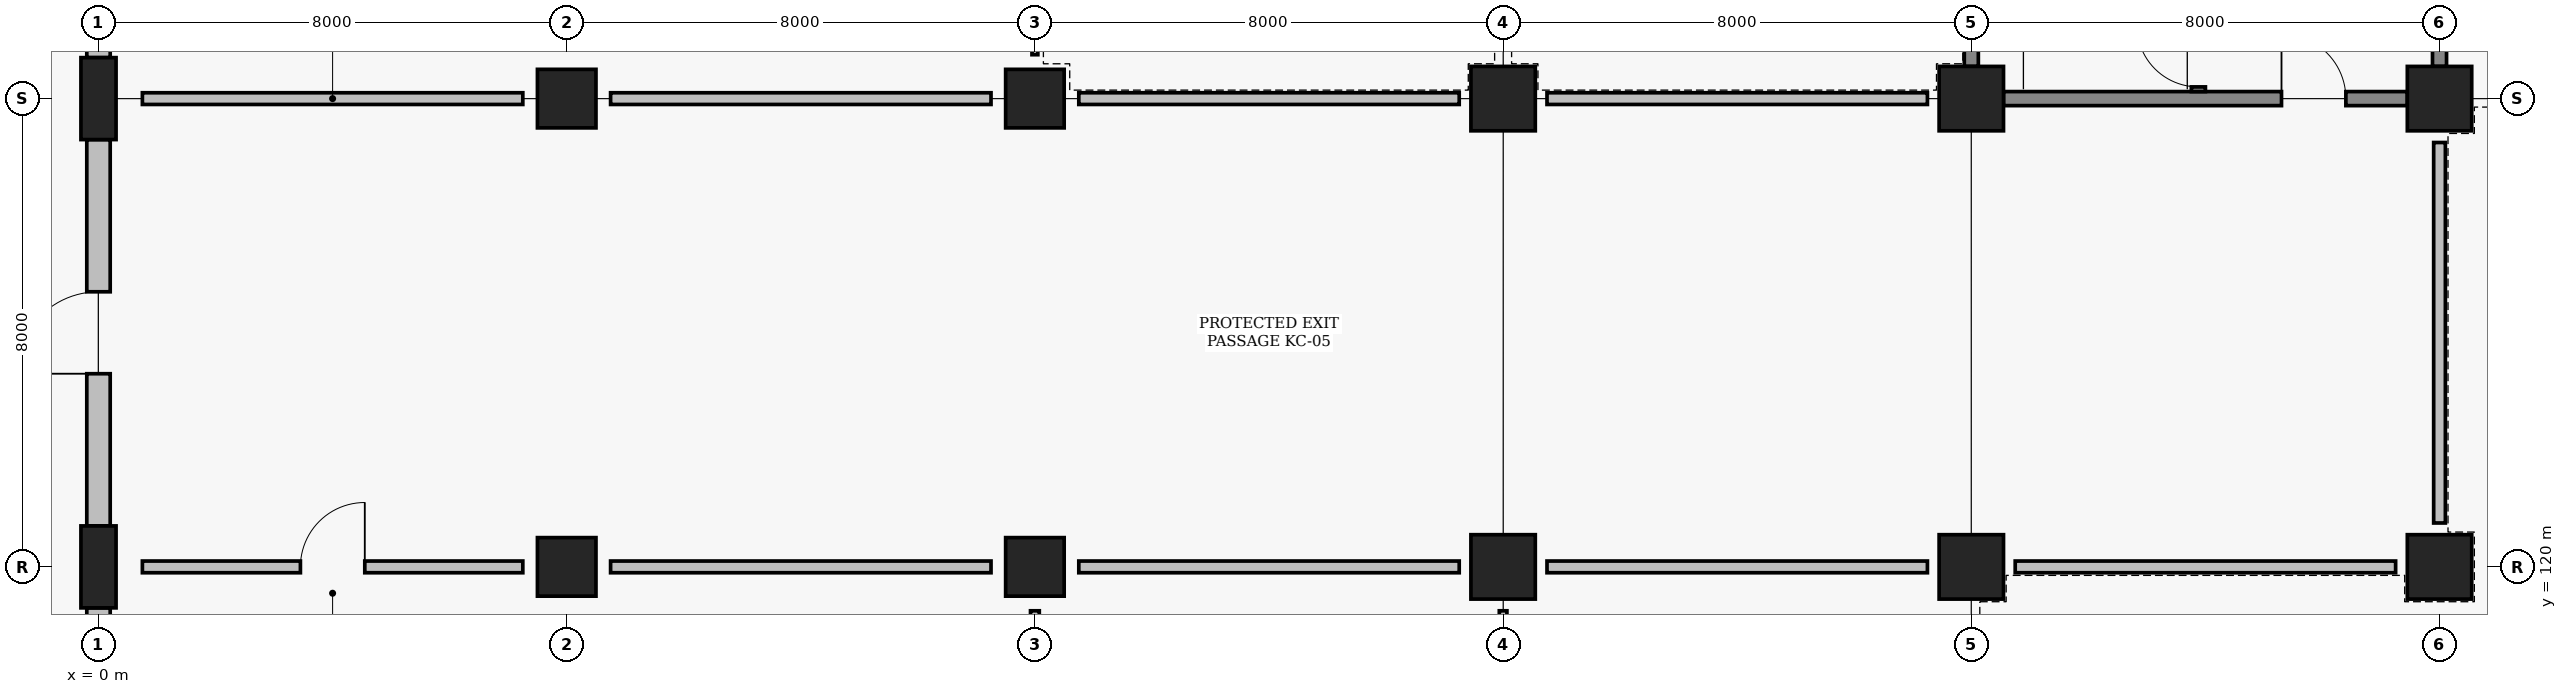
"""IFC4 building model, lengths in metres.
Left out: names, types, materials, properties, quantities, classifications, styles, units other than length and angle.
Written with IfcOpenShell. Run it as: python <this file> out.ifc"""

import sys

from ifc_helpers import new_model, si_unit, direction, frame, frame_2d, origin, origin_2d, place, context, subcontext, project, spatial, rectangle, circle, extrude, element, fill, save


model = new_model("IFC4")
c1 = context("Model", 3, precision=1e-05, world=origin(), true_north=direction((0.0, 1.0)))
c2 = subcontext(c1, "Body", "Model", "MODEL_VIEW")
j1 = project(units=[si_unit("LENGTHUNIT", "METRE"), si_unit("PLANEANGLEUNIT", "RADIAN")], contexts=[c1])
p1 = place(None, origin())
s1 = spatial("IfcSite", under=j1, at=p1, CompositionType="ELEMENT")
p2 = place(p1, origin())
s2 = spatial("IfcBuilding", under=s1, at=p2, CompositionType="ELEMENT")
p3 = place(p2, origin())
s3 = spatial("IfcBuildingStorey", under=s2, at=p3, CompositionType="ELEMENT", Elevation=0.0)
for number, where, z_axis, x_axis in (
    (1, (0.0, 120.0, 0.0), (0.0, 0.0, 1.0), (1.0, 0.0, 0.0)),
    (2, (0.0, 128.0, 0.0), (0.0, 0.0, 1.0), (1.0, 0.0, 0.0)),
):
    element("IfcColumn", number, at=place(p3, frame(where, z_axis=z_axis, x_axis=x_axis)), inside=s3, PredefinedType="PILASTER", context=c2, shape_type="SweptSolid", body=[
        extrude(rectangle(XDim=0.6, YDim=1.4, at=origin_2d()), origin(), (0.0, 0.0, 1.0), 4.8),
    ])
for number, where, z_axis, x_axis in (
    (3, (8.0, 120.0, 0.0), (0.0, 0.0, 1.0), (1.0, 0.0, 0.0)),
    (4, (8.0, 128.0, 0.0), (0.0, 0.0, 1.0), (1.0, 0.0, 0.0)),
    (5, (16.0, 120.0, 0.0), (0.0, 0.0, 1.0), (1.0, 0.0, 0.0)),
    (6, (16.0, 128.0, 0.0), (0.0, 0.0, 1.0), (1.0, 0.0, 0.0)),
):
    element("IfcColumn", number, at=place(p3, frame(where, z_axis=z_axis, x_axis=x_axis)), inside=s3, PredefinedType="COLUMN", context=c2, shape_type="SweptSolid", body=[
        extrude(circle(Radius=0.5, at=origin_2d()), origin(), (0.0, 0.0, 1.0), 4.8),
    ])
for number, where, z_axis, x_axis in (
    (7, (24.0, 120.0, 0.0), (0.0, 0.0, 1.0), (1.0, 0.0, 0.0)),
    (8, (24.0, 128.0, 0.0), (0.0, 0.0, 1.0), (1.0, 0.0, 0.0)),
    (9, (32.0, 120.0, 0.0), (0.0, 0.0, 1.0), (1.0, 0.0, 0.0)),
    (10, (32.0, 128.0, 0.0), (0.0, 0.0, 1.0), (1.0, 0.0, 0.0)),
    (11, (40.0, 120.0, 0.0), (0.0, 0.0, 1.0), (1.0, 0.0, 0.0)),
    (12, (40.0, 128.0, 0.0), (0.0, 0.0, 1.0), (1.0, 0.0, 0.0)),
):
    element("IfcColumn", number, at=place(p3, frame(where, z_axis=z_axis, x_axis=x_axis)), inside=s3, PredefinedType="COLUMN", context=c2, shape_type="SweptSolid", body=[
        extrude(rectangle(XDim=1.1, YDim=1.1, at=origin_2d()), origin(), (0.0, 0.0, 1.0), 4.8),
    ])
p4 = place(p3, frame((0.0, 112.7, 0.0), z_axis=(0.0, 0.0, 1.0), x_axis=(0.0, 1.0, 0.0)))
e13 = element("IfcWall", 13, at=p4, inside=s3, PredefinedType="SOLIDWALL", context=c2, shape_type="SweptSolid", body=[
    extrude(rectangle(XDim=6.6, YDim=0.4, at=frame_2d((3.3, 0.0))), origin(), (0.0, 0.0, 1.0), 3.66),
])
p5 = place(p4, frame((1.5, 0.0, 0.0)))
e14 = element("IfcOpeningElement", 14, at=p5, cuts=e13, PredefinedType="OPENING", context=c2, shape_type="SweptSolid", body=[
    extrude(rectangle(XDim=3.6, YDim=2.8, at=frame_2d((1.8, 1.4))), frame((0.0, 0.21, 0.0), z_axis=(0.0, -1.0, 0.0), x_axis=(1.0, 0.0, 0.0)), (0.0, 0.0, 1.0), 0.42),
])
p6 = place(p3, frame((0.0, 120.7, 0.0), z_axis=(0.0, 0.0, 1.0), x_axis=(0.0, 1.0, 0.0)))
e15 = element("IfcWall", 15, at=p6, inside=s3, PredefinedType="SOLIDWALL", context=c2, shape_type="SweptSolid", body=[
    extrude(rectangle(XDim=6.6, YDim=0.4, at=frame_2d((3.3, 0.0))), origin(), (0.0, 0.0, 1.0), 3.66),
])
p7 = place(p6, frame((2.6, 0.0, 0.0)))
e16 = element("IfcOpeningElement", 16, at=p7, cuts=e15, PredefinedType="OPENING", context=c2, shape_type="SweptSolid", body=[
    extrude(rectangle(XDim=1.4, YDim=2.2, at=frame_2d((0.7, 1.1))), frame((0.0, 0.21, 0.0), z_axis=(0.0, -1.0, 0.0), x_axis=(1.0, 0.0, 0.0)), (0.0, 0.0, 1.0), 0.42),
])
p8 = place(p3, frame((0.0, 128.7, 0.0), z_axis=(0.0, 0.0, 1.0), x_axis=(0.0, 1.0, 0.0)))
e17 = element("IfcWall", 17, at=p8, inside=s3, PredefinedType="SOLIDWALL", context=c2, shape_type="SweptSolid", body=[
    extrude(rectangle(XDim=6.6, YDim=0.4, at=frame_2d((3.3, 0.0))), origin(), (0.0, 0.0, 1.0), 3.91),
])
p9 = place(p8, frame((1.6, 0.0, 0.0)))
e18 = element("IfcOpeningElement", 18, at=p9, cuts=e17, PredefinedType="OPENING", context=c2, shape_type="SweptSolid", body=[
    extrude(rectangle(XDim=3.4, YDim=2.75, at=frame_2d((1.7, 1.375))), frame((0.0, 0.21, 0.0), z_axis=(0.0, -1.0, 0.0), x_axis=(1.0, 0.0, 0.0)), (0.0, 0.0, 1.0), 0.42),
])
p10 = place(p3, frame((32.55, 128.0, 0.0), z_axis=(0.0, 0.0, 1.0), x_axis=(1.0, 0.0, 0.0)))
e19 = element("IfcWall", 19, at=p10, inside=s3, PredefinedType="SHEAR", context=c2, shape_type="SweptSolid", body=[
    extrude(rectangle(XDim=6.9, YDim=0.24, at=frame_2d((3.45, 0.0))), origin(), (0.0, 0.0, 1.0), 3.77),
])
p11 = place(p10, frame((4.75, 0.0, 0.0)))
e20 = element("IfcOpeningElement", 20, at=p11, cuts=e19, PredefinedType="OPENING", context=c2, shape_type="SweptSolid", body=[
    extrude(rectangle(XDim=1.1, YDim=2.2, at=frame_2d((0.55, 1.1))), frame((0.0, 0.13, 0.0), z_axis=(0.0, -1.0, 0.0), x_axis=(1.0, 0.0, 0.0)), (0.0, 0.0, 1.0), 0.26),
])
p12 = place(p3, frame((32.0, 128.55, 0.0), z_axis=(0.0, 0.0, 1.0), x_axis=(0.0, 1.0, 0.0)))
e21 = element("IfcWall", 21, at=p12, inside=s3, PredefinedType="SHEAR", context=c2, shape_type="SweptSolid", body=[
    extrude(rectangle(XDim=6.9, YDim=0.24, at=frame_2d((3.45, 0.0))), origin(), (0.0, 0.0, 1.0), 3.62),
])
p13 = place(p3, frame((40.0, 128.55, 0.0), z_axis=(0.0, 0.0, 1.0), x_axis=(0.0, 1.0, 0.0)))
e22 = element("IfcWall", 22, at=p13, inside=s3, PredefinedType="SHEAR", context=c2, shape_type="SweptSolid", body=[
    extrude(rectangle(XDim=6.9, YDim=0.24, at=frame_2d((3.45, 0.0))), origin(), (0.0, 0.0, 1.0), 3.77),
])
p14 = place(p3, frame((35.88, 128.12, 0.0), z_axis=(0.0, 0.0, 1.0), x_axis=(0.0, 1.0, 0.0)))
e23 = element("IfcWall", 23, at=p14, inside=s3, PredefinedType="SHEAR", context=c2, shape_type="SweptSolid", body=[
    extrude(rectangle(XDim=7.76, YDim=0.24, at=frame_2d((3.88, 0.0))), origin(), (0.0, 0.0, 1.0), 3.97),
])
p15 = place(p14, frame((0.08, 0.0, 0.0)))
e24 = element("IfcOpeningElement", 24, at=p15, cuts=e23, PredefinedType="OPENING", context=c2, shape_type="SweptSolid", body=[
    extrude(rectangle(XDim=1.05, YDim=2.15, at=frame_2d((0.525, 1.075))), frame((0.0, 0.13, 0.0), z_axis=(0.0, -1.0, 0.0), x_axis=(1.0, 0.0, 0.0)), (0.0, 0.0, 1.0), 0.26),
])
p16 = place(p3, frame((0.75, 120.0, 0.0), z_axis=(0.0, 0.0, 1.0), x_axis=(1.0, 0.0, 0.0)))
e25 = element("IfcWall", 25, at=p16, inside=s3, PredefinedType="PARTITIONING", context=c2, shape_type="SweptSolid", body=[
    extrude(rectangle(XDim=6.5, YDim=0.2, at=frame_2d((3.25, 0.0))), origin(), (0.0, 0.0, 1.0), 3.66),
])
p17 = place(p16, frame((2.7, 0.0, 0.0)))
e26 = element("IfcOpeningElement", 26, at=p17, cuts=e25, PredefinedType="OPENING", context=c2, shape_type="SweptSolid", body=[
    extrude(rectangle(XDim=1.1, YDim=2.2, at=frame_2d((0.55, 1.1))), frame((0.0, 0.11, 0.0), z_axis=(0.0, -1.0, 0.0), x_axis=(1.0, 0.0, 0.0)), (0.0, 0.0, 1.0), 0.22),
])
for number, where, z_axis, x_axis in (
    (27, (0.75, 128.0, 0.0), (0.0, 0.0, 1.0), (1.0, 0.0, 0.0)),
    (28, (8.75, 120.0, 0.0), (0.0, 0.0, 1.0), (1.0, 0.0, 0.0)),
    (29, (8.75, 128.0, 0.0), (0.0, 0.0, 1.0), (1.0, 0.0, 0.0)),
    (30, (16.75, 120.0, 0.0), (0.0, 0.0, 1.0), (1.0, 0.0, 0.0)),
    (31, (16.75, 128.0, 0.0), (0.0, 0.0, 1.0), (1.0, 0.0, 0.0)),
):
    element("IfcWall", number, at=place(p3, frame(where, z_axis=z_axis, x_axis=x_axis)), inside=s3, PredefinedType="PARTITIONING", context=c2, shape_type="SweptSolid", body=[
        extrude(rectangle(XDim=6.5, YDim=0.2, at=frame_2d((3.25, 0.0))), origin(), (0.0, 0.0, 1.0), 3.91),
    ])
for number, where, z_axis, x_axis in (
    (32, (24.75, 120.0, 0.0), (0.0, 0.0, 1.0), (1.0, 0.0, 0.0)),
    (33, (24.75, 128.0, 0.0), (0.0, 0.0, 1.0), (1.0, 0.0, 0.0)),
):
    element("IfcWall", number, at=place(p3, frame(where, z_axis=z_axis, x_axis=x_axis)), inside=s3, PredefinedType="PARTITIONING", context=c2, shape_type="SweptSolid", body=[
        extrude(rectangle(XDim=6.5, YDim=0.2, at=frame_2d((3.25, 0.0))), origin(), (0.0, 0.0, 1.0), 3.87),
    ])
p18 = place(p3, frame((40.0, 120.75, 0.0), z_axis=(0.0, 0.0, 1.0), x_axis=(0.0, 1.0, 0.0)))
e34 = element("IfcWall", 34, at=p18, inside=s3, PredefinedType="PARTITIONING", context=c2, shape_type="SweptSolid", body=[
    extrude(rectangle(XDim=6.5, YDim=0.2, at=frame_2d((3.25, 0.0))), origin(), (0.0, 0.0, 1.0), 3.77),
])
p19 = place(p3, frame((32.75, 120.0, 0.0), z_axis=(0.0, 0.0, 1.0), x_axis=(1.0, 0.0, 0.0)))
e35 = element("IfcWall", 35, at=p19, inside=s3, PredefinedType="PARTITIONING", context=c2, shape_type="SweptSolid", body=[
    extrude(rectangle(XDim=6.5, YDim=0.2, at=frame_2d((3.25, 0.0))), origin(), (0.0, 0.0, 1.0), 3.87),
])
p20 = place(p3, frame((16.0, 112.75, 0.0), z_axis=(0.0, 0.0, 1.0), x_axis=(0.0, 1.0, 0.0)))
e36 = element("IfcWall", 36, at=p20, inside=s3, PredefinedType="PARTITIONING", context=c2, shape_type="SweptSolid", body=[
    extrude(rectangle(XDim=6.5, YDim=0.15, at=frame_2d((3.25, 0.0))), origin(), (0.0, 0.0, 1.0), 3.81),
])
p21 = place(p20, frame((2.35, 0.0, 0.0)))
e37 = element("IfcOpeningElement", 37, at=p21, cuts=e36, PredefinedType="OPENING", context=c2, shape_type="SweptSolid", body=[
    extrude(rectangle(XDim=1.8, YDim=2.3, at=frame_2d((0.9, 1.15))), frame((0.0, 0.085, 0.0), z_axis=(0.0, -1.0, 0.0), x_axis=(1.0, 0.0, 0.0)), (0.0, 0.0, 1.0), 0.17),
])
p22 = place(p3, frame((24.0, 112.75, 0.0), z_axis=(0.0, 0.0, 1.0), x_axis=(0.0, 1.0, 0.0)))
e38 = element("IfcWall", 38, at=p22, inside=s3, PredefinedType="PARTITIONING", context=c2, shape_type="SweptSolid", body=[
    extrude(rectangle(XDim=6.5, YDim=0.13, at=frame_2d((3.25, 0.0))), origin(), (0.0, 0.0, 1.0), 3.77),
])
p23 = place(p22, frame((2.75, 0.0, 0.0)))
e39 = element("IfcOpeningElement", 39, at=p23, cuts=e38, PredefinedType="OPENING", context=c2, shape_type="SweptSolid", body=[
    extrude(rectangle(XDim=1.0, YDim=2.1, at=frame_2d((0.5, 1.05))), frame((0.0, 0.075, 0.0), z_axis=(0.0, -1.0, 0.0), x_axis=(1.0, 0.0, 0.0)), (0.0, 0.0, 1.0), 0.15),
])
p24 = place(p3, frame((16.0, 128.75, 0.0), z_axis=(0.0, 0.0, 1.0), x_axis=(0.0, 1.0, 0.0)))
e40 = element("IfcWall", 40, at=p24, inside=s3, PredefinedType="PARTITIONING", context=c2, shape_type="SweptSolid", body=[
    extrude(rectangle(XDim=6.5, YDim=0.1, at=frame_2d((3.25, 0.0))), origin(), (0.0, 0.0, 1.0), 3.81),
])
p25 = place(p24, frame((2.775, 0.0, 0.0)))
e41 = element("IfcOpeningElement", 41, at=p25, cuts=e40, PredefinedType="OPENING", context=c2, shape_type="SweptSolid", body=[
    extrude(rectangle(XDim=0.95, YDim=2.1, at=frame_2d((0.475, 1.05))), frame((0.0, 0.06, 0.0), z_axis=(0.0, -1.0, 0.0), x_axis=(1.0, 0.0, 0.0)), (0.0, 0.0, 1.0), 0.12),
])
p26 = place(p7, origin())
e42 = element("IfcDoor", 42, at=p26, inside=s3, OperationType="SINGLE_SWING_LEFT", PredefinedType="DOOR", context=c2, shape_type="SweptSolid", body=[
    extrude(rectangle(XDim=1.4, YDim=2.2, at=frame_2d((0.7, 1.1))), frame((0.0, 0.025, 0.0), z_axis=(0.0, -1.0, 0.0), x_axis=(1.0, 0.0, 0.0)), (0.0, 0.0, 1.0), 0.05),
])
fill(e16, e42)
p27 = place(p11, origin())
e43 = element("IfcDoor", 43, at=p27, inside=s3, OperationType="SINGLE_SWING_LEFT", PredefinedType="DOOR", context=c2, shape_type="SweptSolid", body=[
    extrude(rectangle(XDim=1.1, YDim=2.2, at=frame_2d((0.55, 1.1))), frame((0.0, 0.025, 0.0), z_axis=(0.0, -1.0, 0.0), x_axis=(1.0, 0.0, 0.0)), (0.0, 0.0, 1.0), 0.05),
])
fill(e20, e43)
p28 = place(p15, origin())
e44 = element("IfcDoor", 44, at=p28, inside=s3, OperationType="SINGLE_SWING_RIGHT", PredefinedType="DOOR", context=c2, shape_type="SweptSolid", body=[
    extrude(rectangle(XDim=1.05, YDim=2.15, at=frame_2d((0.525, 1.075))), frame((0.0, 0.025, 0.0), z_axis=(0.0, -1.0, 0.0), x_axis=(1.0, 0.0, 0.0)), (0.0, 0.0, 1.0), 0.05),
])
fill(e24, e44)
p29 = place(p17, origin())
e45 = element("IfcDoor", 45, at=p29, inside=s3, OperationType="SINGLE_SWING_RIGHT", PredefinedType="DOOR", context=c2, shape_type="SweptSolid", body=[
    extrude(rectangle(XDim=1.1, YDim=2.2, at=frame_2d((0.55, 1.1))), frame((0.0, 0.025, 0.0), z_axis=(0.0, -1.0, 0.0), x_axis=(1.0, 0.0, 0.0)), (0.0, 0.0, 1.0), 0.05),
])
fill(e26, e45)
save(model, sys.argv[1])
